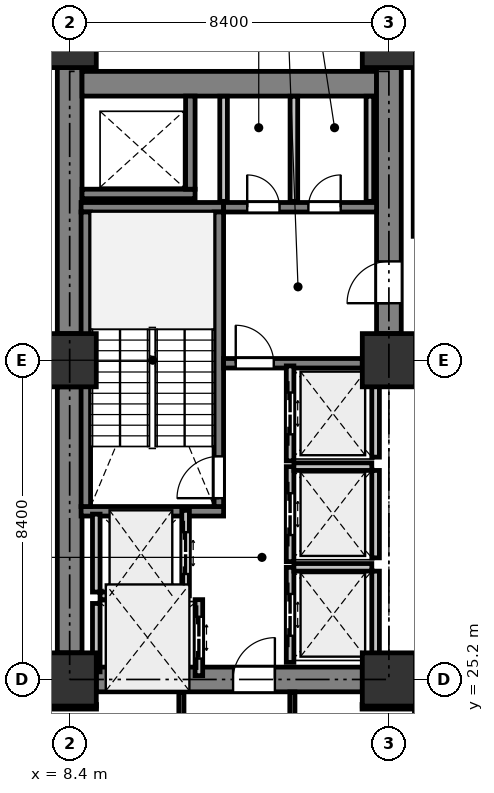
"""IFC4 building model, lengths in metres.
Left out: names, types, materials, properties, quantities, classifications, styles, units other than length and angle.
Written with IfcOpenShell. Run it as: python <this file> out.ifc"""

import sys

from ifc_helpers import new_model, si_unit, direction, frame, frame_2d, origin, origin_2d, place, context, subcontext, project, spatial, rectangle, extrude, element, fill, save


model = new_model("IFC4")
c1 = context("Model", 3, precision=1e-05, world=origin(), true_north=direction((0.0, 1.0)))
c2 = subcontext(c1, "Body", "Model", "MODEL_VIEW")
j1 = project(units=[si_unit("LENGTHUNIT", "METRE"), si_unit("PLANEANGLEUNIT", "RADIAN")], contexts=[c1])
p1 = place(None, origin())
s1 = spatial("IfcSite", under=j1, at=p1, CompositionType="ELEMENT")
p2 = place(p1, origin())
s2 = spatial("IfcBuilding", under=s1, at=p2, CompositionType="ELEMENT")
p3 = place(p2, frame((0.0, 0.0, 37.4)))
s3 = spatial("IfcBuildingStorey", under=s2, at=p3, CompositionType="ELEMENT", Elevation=37.4)
for number, where, z_axis, x_axis in (
    (1, (8.4, 25.2, 0.0), (0.0, 0.0, 1.0), (1.0, 0.0, 0.0)),
    (2, (8.4, 33.6, 0.0), (0.0, 0.0, 1.0), (1.0, 0.0, 0.0)),
    (3, (8.4, 42.0, 0.0), (0.0, 0.0, 1.0), (1.0, 0.0, 0.0)),
    (4, (16.8, 25.2, 0.0), (0.0, 0.0, 1.0), (1.0, 0.0, 0.0)),
    (5, (16.8, 33.6, 0.0), (0.0, 0.0, 1.0), (1.0, 0.0, 0.0)),
    (6, (16.8, 42.0, 0.0), (0.0, 0.0, 1.0), (1.0, 0.0, 0.0)),
):
    element("IfcColumn", number, at=place(p3, frame(where, z_axis=z_axis, x_axis=x_axis)), inside=s3, PredefinedType="COLUMN", context=c2, shape_type="SweptSolid", body=[
        extrude(rectangle(XDim=1.4, YDim=1.4, at=origin_2d()), origin(), (0.0, 0.0, 1.0), 4.2),
    ])
for number, where, z_axis, x_axis in (
    (7, (8.4, 25.9, 0.0), (0.0, 0.0, 1.0), (0.0, 1.0, 0.0)),
    (8, (8.4, 34.3, 0.0), (0.0, 0.0, 1.0), (0.0, 1.0, 0.0)),
):
    element("IfcWall", number, at=place(p3, frame(where, z_axis=z_axis, x_axis=x_axis)), inside=s3, PredefinedType="SHEAR", context=c2, shape_type="SweptSolid", body=[
        extrude(rectangle(XDim=7.0, YDim=0.65, at=frame_2d((3.5, 0.0))), origin(), (0.0, 0.0, 1.0), 3.925),
    ])
p4 = place(p3, frame((8.725, 40.875, 0.0), z_axis=(0.0, 0.0, 1.0), x_axis=(1.0, 0.0, 0.0)))
e9 = element("IfcWall", 9, at=p4, inside=s3, PredefinedType="SHEAR", context=c2, shape_type="SweptSolid", body=[
    extrude(rectangle(XDim=7.75, YDim=0.65, at=frame_2d((3.875, 0.0))), origin(), (0.0, 0.0, 1.0), 3.925),
])
p5 = place(p3, frame((16.8, 34.3, 0.0), z_axis=(0.0, 0.0, 1.0), x_axis=(0.0, 1.0, 0.0)))
e10 = element("IfcWall", 10, at=p5, inside=s3, PredefinedType="SHEAR", context=c2, shape_type="SweptSolid", body=[
    extrude(rectangle(XDim=7.0, YDim=0.65, at=frame_2d((3.5, 0.0))), origin(), (0.0, 0.0, 1.0), 3.925),
])
p6 = place(p5, frame((0.8, 0.0, 0.0)))
e11 = element("IfcOpeningElement", 11, at=p6, cuts=e10, PredefinedType="OPENING", context=c2, shape_type="SweptSolid", body=[
    extrude(rectangle(XDim=1.1, YDim=2.15, at=frame_2d((0.55, 1.075))), frame((0.0, 0.335, 0.0), z_axis=(0.0, -1.0, 0.0), x_axis=(1.0, 0.0, 0.0)), (0.0, 0.0, 1.0), 0.67),
])
p7 = place(p3, frame((9.1, 25.2, 0.0), z_axis=(0.0, 0.0, 1.0), x_axis=(1.0, 0.0, 0.0)))
e12 = element("IfcWall", 12, at=p7, inside=s3, PredefinedType="SHEAR", context=c2, shape_type="SweptSolid", body=[
    extrude(rectangle(XDim=7.0, YDim=0.65, at=frame_2d((3.5, 0.0))), origin(), (0.0, 0.0, 1.0), 3.925),
])
p8 = place(p7, frame((3.6, 0.0, 0.0)))
e13 = element("IfcOpeningElement", 13, at=p8, cuts=e12, PredefinedType="OPENING", context=c2, shape_type="SweptSolid", body=[
    extrude(rectangle(XDim=1.1, YDim=2.15, at=frame_2d((0.55, 1.075))), frame((0.0, 0.335, 0.0), z_axis=(0.0, -1.0, 0.0), x_axis=(1.0, 0.0, 0.0)), (0.0, 0.0, 1.0), 0.67),
])
for number, where, z_axis, x_axis in (
    (14, (12.45, 29.625, 0.0), (0.0, 0.0, 1.0), (-1.0, 0.0, 0.0)),
    (15, (12.45, 37.625, 0.0), (0.0, 0.0, 1.0), (-1.0, 0.0, 0.0)),
):
    element("IfcWall", number, at=place(p3, frame(where, z_axis=z_axis, x_axis=x_axis)), inside=s3, PredefinedType="SHEAR", context=c2, shape_type="SweptSolid", body=[
        extrude(rectangle(XDim=3.75, YDim=0.25, at=frame_2d((1.875, 0.0))), origin(), (0.0, 0.0, 1.0), 3.925),
    ])
p9 = place(p3, frame((12.325, 29.75, 0.0), z_axis=(0.0, 0.0, 1.0), x_axis=(0.0, 1.0, 0.0)))
e16 = element("IfcWall", 16, at=p9, inside=s3, PredefinedType="SHEAR", context=c2, shape_type="SweptSolid", body=[
    extrude(rectangle(XDim=7.75, YDim=0.25, at=frame_2d((3.875, 0.0))), origin(), (0.0, 0.0, 1.0), 3.925),
])
p10 = place(p9, frame((0.22, 0.0, 0.0)))
e17 = element("IfcOpeningElement", 17, at=p10, cuts=e16, PredefinedType="OPENING", context=c2, shape_type="SweptSolid", body=[
    extrude(rectangle(XDim=1.1, YDim=2.15, at=frame_2d((0.55, 1.075))), frame((0.0, 0.135, 0.0), z_axis=(0.0, -1.0, 0.0), x_axis=(1.0, 0.0, 0.0)), (0.0, 0.0, 1.0), 0.27),
])
p11 = place(p3, frame((8.825, 29.75, 0.0), z_axis=(0.0, 0.0, 1.0), x_axis=(0.0, 1.0, 0.0)))
e18 = element("IfcWall", 18, at=p11, inside=s3, PredefinedType="SHEAR", context=c2, shape_type="SweptSolid", body=[
    extrude(rectangle(XDim=7.75, YDim=0.25, at=frame_2d((3.875, 0.0))), origin(), (0.0, 0.0, 1.0), 3.925),
])
p12 = place(p3, frame((8.725, 37.975, 0.0), z_axis=(0.0, 0.0, 1.0), x_axis=(1.0, 0.0, 0.0)))
e19 = element("IfcWall", 19, at=p12, inside=s3, PredefinedType="SHEAR", context=c2, shape_type="SweptSolid", body=[
    extrude(rectangle(XDim=2.975, YDim=0.25, at=frame_2d((1.487, 0.0))), origin(), (0.0, 0.0, 1.0), 3.925),
])
p13 = place(p3, frame((11.575, 38.1, 0.0), z_axis=(0.0, 0.0, 1.0), x_axis=(0.0, 1.0, 0.0)))
e20 = element("IfcWall", 20, at=p13, inside=s3, PredefinedType="SHEAR", context=c2, shape_type="SweptSolid", body=[
    extrude(rectangle(XDim=2.45, YDim=0.25, at=frame_2d((1.225, 0.0))), origin(), (0.0, 0.0, 1.0), 3.925),
])
p14 = place(p3, frame((12.45, 33.52, 0.0), z_axis=(0.0, 0.0, 1.0), x_axis=(1.0, 0.0, 0.0)))
e21 = element("IfcWall", 21, at=p14, inside=s3, PredefinedType="SHEAR", context=c2, shape_type="SweptSolid", body=[
    extrude(rectangle(XDim=3.65, YDim=0.25, at=frame_2d((1.825, 0.0))), origin(), (0.0, 0.0, 1.0), 3.925),
])
p15 = place(p14, frame((0.32, 0.0, 0.0)))
e22 = element("IfcOpeningElement", 22, at=p15, cuts=e21, PredefinedType="OPENING", context=c2, shape_type="SweptSolid", body=[
    extrude(rectangle(XDim=1.0, YDim=2.15, at=frame_2d((0.5, 1.075))), frame((0.0, 0.135, 0.0), z_axis=(0.0, -1.0, 0.0), x_axis=(1.0, 0.0, 0.0)), (0.0, 0.0, 1.0), 0.27),
])
p16 = place(p3, frame((12.45, 37.625, 0.0), z_axis=(0.0, 0.0, 1.0), x_axis=(1.0, 0.0, 0.0)))
e23 = element("IfcWall", 23, at=p16, inside=s3, PredefinedType="SHEAR", context=c2, shape_type="SweptSolid", body=[
    extrude(rectangle(XDim=4.025, YDim=0.25, at=frame_2d((2.013, 0.0))), origin(), (0.0, 0.0, 1.0), 3.925),
])
p17 = place(p16, frame((0.622, 0.0, 0.0)))
e24 = element("IfcOpeningElement", 24, at=p17, cuts=e23, PredefinedType="OPENING", context=c2, shape_type="SweptSolid", body=[
    extrude(rectangle(XDim=0.85, YDim=2.15, at=frame_2d((0.425, 1.075))), frame((0.0, 0.135, 0.0), z_axis=(0.0, -1.0, 0.0), x_axis=(1.0, 0.0, 0.0)), (0.0, 0.0, 1.0), 0.27),
])
p18 = place(p16, frame((2.231, 0.0, 0.0)))
e25 = element("IfcOpeningElement", 25, at=p18, cuts=e23, PredefinedType="OPENING", context=c2, shape_type="SweptSolid", body=[
    extrude(rectangle(XDim=0.85, YDim=2.15, at=frame_2d((0.425, 1.075))), frame((0.0, 0.135, 0.0), z_axis=(0.0, -1.0, 0.0), x_axis=(1.0, 0.0, 0.0)), (0.0, 0.0, 1.0), 0.27),
])
p19 = place(p3, frame((11.45, 27.4, 0.0), z_axis=(0.0, 0.0, 1.0), x_axis=(0.0, 1.0, 0.0)))
e26 = element("IfcWall", 26, at=p19, inside=s3, PredefinedType="PARTITIONING", context=c2, shape_type="SweptSolid", body=[
    extrude(rectangle(XDim=2.25, YDim=0.2, at=frame_2d((1.125, 0.0))), origin(), (0.0, 0.0, 1.0), 3.925),
])
p20 = place(p19, frame((0.575, 0.0, 0.0)))
e27 = element("IfcOpeningElement", 27, at=p20, cuts=e26, PredefinedType="OPENING", context=c2, shape_type="SweptSolid", body=[
    extrude(rectangle(XDim=1.1, YDim=2.2, at=frame_2d((0.55, 1.1))), frame((0.0, 0.11, 0.0), z_axis=(0.0, -1.0, 0.0), x_axis=(1.0, 0.0, 0.0)), (0.0, 0.0, 1.0), 0.22),
])
p21 = place(p3, frame((9.1, 27.5, 0.0), z_axis=(0.0, 0.0, 1.0), x_axis=(0.0, 1.0, 0.0)))
e28 = element("IfcWall", 28, at=p21, inside=s3, PredefinedType="PARTITIONING", context=c2, shape_type="SweptSolid", body=[
    extrude(rectangle(XDim=2.05, YDim=0.2, at=frame_2d((1.025, 0.0))), origin(), (0.0, 0.0, 1.0), 3.925),
])
p22 = place(p3, frame((9.2, 27.4, 0.0), z_axis=(0.0, 0.0, 1.0), x_axis=(1.0, 0.0, 0.0)))
e29 = element("IfcWall", 29, at=p22, inside=s3, PredefinedType="PARTITIONING", context=c2, shape_type="SweptSolid", body=[
    extrude(rectangle(XDim=2.15, YDim=0.2, at=frame_2d((1.075, 0.0))), origin(), (0.0, 0.0, 1.0), 3.925),
])
p23 = place(p3, frame((11.8, 25.3, 0.0), z_axis=(0.0, 0.0, 1.0), x_axis=(0.0, 1.0, 0.0)))
e30 = element("IfcWall", 30, at=p23, inside=s3, PredefinedType="PARTITIONING", context=c2, shape_type="SweptSolid", body=[
    extrude(rectangle(XDim=2.0, YDim=0.2, at=frame_2d((1.0, 0.0))), origin(), (0.0, 0.0, 1.0), 3.925),
])
p24 = place(p23, frame((0.45, 0.0, 0.0)))
e31 = element("IfcOpeningElement", 31, at=p24, cuts=e30, PredefinedType="OPENING", context=c2, shape_type="SweptSolid", body=[
    extrude(rectangle(XDim=1.1, YDim=2.2, at=frame_2d((0.55, 1.1))), frame((0.0, 0.11, 0.0), z_axis=(0.0, -1.0, 0.0), x_axis=(1.0, 0.0, 0.0)), (0.0, 0.0, 1.0), 0.22),
])
p25 = place(p3, frame((9.1, 25.4, 0.0), z_axis=(0.0, 0.0, 1.0), x_axis=(0.0, 1.0, 0.0)))
e32 = element("IfcWall", 32, at=p25, inside=s3, PredefinedType="PARTITIONING", context=c2, shape_type="SweptSolid", body=[
    extrude(rectangle(XDim=1.8, YDim=0.2, at=frame_2d((0.9, 0.0))), origin(), (0.0, 0.0, 1.0), 3.925),
])
p26 = place(p3, frame((14.2, 25.65, 0.0), z_axis=(0.0, 0.0, 1.0), x_axis=(0.0, 1.0, 0.0)))
e33 = element("IfcWall", 33, at=p26, inside=s3, PredefinedType="PARTITIONING", context=c2, shape_type="SweptSolid", body=[
    extrude(rectangle(XDim=2.5, YDim=0.2, at=frame_2d((1.25, 0.0))), origin(), (0.0, 0.0, 1.0), 3.925),
])
p27 = place(p26, frame((0.7, 0.0, 0.0)))
e34 = element("IfcOpeningElement", 34, at=p27, cuts=e33, PredefinedType="OPENING", context=c2, shape_type="SweptSolid", body=[
    extrude(rectangle(XDim=1.1, YDim=2.2, at=frame_2d((0.55, 1.1))), frame((0.0, 0.11, 0.0), z_axis=(0.0, -1.0, 0.0), x_axis=(1.0, 0.0, 0.0)), (0.0, 0.0, 1.0), 0.22),
])
p28 = place(p3, frame((16.45, 25.75, 0.0), z_axis=(0.0, 0.0, 1.0), x_axis=(0.0, 1.0, 0.0)))
e35 = element("IfcWall", 35, at=p28, inside=s3, PredefinedType="PARTITIONING", context=c2, shape_type="SweptSolid", body=[
    extrude(rectangle(XDim=2.3, YDim=0.2, at=frame_2d((1.15, 0.0))), origin(), (0.0, 0.0, 1.0), 3.925),
])
p29 = place(p3, frame((14.3, 28.15, 0.0), z_axis=(0.0, 0.0, 1.0), x_axis=(1.0, 0.0, 0.0)))
e36 = element("IfcWall", 36, at=p29, inside=s3, PredefinedType="PARTITIONING", context=c2, shape_type="SweptSolid", body=[
    extrude(rectangle(XDim=2.05, YDim=0.2, at=frame_2d((1.025, 0.0))), origin(), (0.0, 0.0, 1.0), 3.925),
])
p30 = place(p3, frame((14.2, 28.3, 0.0), z_axis=(0.0, 0.0, 1.0), x_axis=(0.0, 1.0, 0.0)))
e37 = element("IfcWall", 37, at=p30, inside=s3, PredefinedType="PARTITIONING", context=c2, shape_type="SweptSolid", body=[
    extrude(rectangle(XDim=2.5, YDim=0.2, at=frame_2d((1.25, 0.0))), origin(), (0.0, 0.0, 1.0), 3.925),
])
p31 = place(p30, frame((0.7, 0.0, 0.0)))
e38 = element("IfcOpeningElement", 38, at=p31, cuts=e37, PredefinedType="OPENING", context=c2, shape_type="SweptSolid", body=[
    extrude(rectangle(XDim=1.1, YDim=2.2, at=frame_2d((0.55, 1.1))), frame((0.0, 0.11, 0.0), z_axis=(0.0, -1.0, 0.0), x_axis=(1.0, 0.0, 0.0)), (0.0, 0.0, 1.0), 0.22),
])
p32 = place(p3, frame((16.45, 28.4, 0.0), z_axis=(0.0, 0.0, 1.0), x_axis=(0.0, 1.0, 0.0)))
e39 = element("IfcWall", 39, at=p32, inside=s3, PredefinedType="PARTITIONING", context=c2, shape_type="SweptSolid", body=[
    extrude(rectangle(XDim=2.3, YDim=0.2, at=frame_2d((1.15, 0.0))), origin(), (0.0, 0.0, 1.0), 3.925),
])
p33 = place(p3, frame((14.3, 30.8, 0.0), z_axis=(0.0, 0.0, 1.0), x_axis=(1.0, 0.0, 0.0)))
e40 = element("IfcWall", 40, at=p33, inside=s3, PredefinedType="PARTITIONING", context=c2, shape_type="SweptSolid", body=[
    extrude(rectangle(XDim=2.05, YDim=0.2, at=frame_2d((1.025, 0.0))), origin(), (0.0, 0.0, 1.0), 3.925),
])
p34 = place(p3, frame((14.2, 30.95, 0.0), z_axis=(0.0, 0.0, 1.0), x_axis=(0.0, 1.0, 0.0)))
e41 = element("IfcWall", 41, at=p34, inside=s3, PredefinedType="PARTITIONING", context=c2, shape_type="SweptSolid", body=[
    extrude(rectangle(XDim=2.5, YDim=0.2, at=frame_2d((1.25, 0.0))), origin(), (0.0, 0.0, 1.0), 3.925),
])
p35 = place(p34, frame((0.7, 0.0, 0.0)))
e42 = element("IfcOpeningElement", 42, at=p35, cuts=e41, PredefinedType="OPENING", context=c2, shape_type="SweptSolid", body=[
    extrude(rectangle(XDim=1.1, YDim=2.2, at=frame_2d((0.55, 1.1))), frame((0.0, 0.11, 0.0), z_axis=(0.0, -1.0, 0.0), x_axis=(1.0, 0.0, 0.0)), (0.0, 0.0, 1.0), 0.22),
])
p36 = place(p3, frame((16.45, 31.05, 0.0), z_axis=(0.0, 0.0, 1.0), x_axis=(0.0, 1.0, 0.0)))
e43 = element("IfcWall", 43, at=p36, inside=s3, PredefinedType="PARTITIONING", context=c2, shape_type="SweptSolid", body=[
    extrude(rectangle(XDim=2.3, YDim=0.2, at=frame_2d((1.15, 0.0))), origin(), (0.0, 0.0, 1.0), 3.925),
])
for number, where, z_axis, x_axis in (
    (44, (14.3, 37.78, 0.0), (0.0, 0.0, 1.0), (0.0, 1.0, 0.0)),
    (45, (12.45, 40.546, 0.0), (0.0, 0.0, 1.0), (0.0, -1.0, 0.0)),
    (46, (16.3, 37.78, 0.0), (0.0, 0.0, 1.0), (0.0, 1.0, 0.0)),
):
    element("IfcWall", number, at=place(p3, frame(where, z_axis=z_axis, x_axis=x_axis)), inside=s3, PredefinedType="PARTITIONING", context=c2, shape_type="SweptSolid", body=[
        extrude(rectangle(XDim=2.766, YDim=0.2, at=frame_2d((1.383, 0.0))), origin(), (0.0, 0.0, 1.0), 2.825),
    ])
p37 = place(p3, frame((14.26, 24.871, 0.0), z_axis=(0.0, 0.0, 1.0), x_axis=(0.0, -1.0, 0.0)))
e47 = element("IfcWall", 47, at=p37, inside=s3, PredefinedType="PARTITIONING", context=c2, shape_type="SweptSolid", body=[
    extrude(rectangle(XDim=4.911, YDim=0.135, at=frame_2d((2.456, 0.0))), origin(), (0.0, 0.0, 1.0), 3.925),
])
p38 = place(p3, frame((17.54, 20.031, 0.0), z_axis=(0.0, 0.0, 1.0), x_axis=(0.0, 1.0, 0.0)))
e48 = element("IfcWall", 48, at=p38, inside=s3, PredefinedType="PARTITIONING", context=c2, shape_type="SweptSolid", body=[
    extrude(rectangle(XDim=5.168, YDim=0.135, at=frame_2d((2.584, 0.0))), origin(), (0.0, 0.0, 1.0), 3.313),
])
p39 = place(p38, frame((2.109, 0.0, 0.0)))
e49 = element("IfcOpeningElement", 49, at=p39, cuts=e48, PredefinedType="OPENING", context=c2, shape_type="SweptSolid", body=[
    extrude(rectangle(XDim=0.95, YDim=2.15, at=frame_2d((0.475, 1.075))), frame((0.0, 0.077, 0.0), z_axis=(0.0, -1.0, 0.0), x_axis=(1.0, 0.0, 0.0)), (0.0, 0.0, 1.0), 0.155),
])
p40 = place(p3, frame((17.469, 24.48, 0.0), z_axis=(0.0, 0.0, 1.0), x_axis=(-0.99999993688, 0.000355302873, 0.0)))
e50 = element("IfcWall", 50, at=p40, inside=s3, PredefinedType="PARTITIONING", context=c2, shape_type="SweptSolid", body=[
    extrude(rectangle(XDim=1.374, YDim=0.12, at=frame_2d((0.687, 0.0))), origin(), (0.0, 0.0, 1.0), 3.323),
])
p41 = place(p3, frame((9.106, 24.481, 0.0), z_axis=(0.0, 0.0, 1.0), x_axis=(-0.999999758706, -0.000694685487, 0.0)))
e51 = element("IfcWall", 51, at=p41, inside=s3, PredefinedType="PARTITIONING", context=c2, shape_type="SweptSolid", body=[
    extrude(rectangle(XDim=1.406, YDim=0.12, at=frame_2d((0.703, 0.0))), origin(), (0.0, 0.0, 1.0), 3.323),
])
p42 = place(p3, frame((11.34, 20.039, 0.0), z_axis=(0.0, 0.0, 1.0), x_axis=(0.0, 1.0, 0.0)))
e52 = element("IfcWall", 52, at=p42, inside=s3, PredefinedType="PARTITIONING", context=c2, shape_type="SweptSolid", body=[
    extrude(rectangle(XDim=4.832, YDim=0.135, at=frame_2d((2.416, 0.0))), origin(), (0.0, 0.0, 1.0), 3.925),
])
p43 = place(p3, frame((17.54, 36.86, 0.0), z_axis=(0.0, 0.0, 1.0), x_axis=(0.0, 1.0, 0.0)))
e53 = element("IfcWall", 53, at=p43, inside=s3, PredefinedType="PARTITIONING", context=c2, shape_type="SweptSolid", body=[
    extrude(rectangle(XDim=6.14, YDim=0.2, at=frame_2d((3.07, 0.0))), origin(), (0.0, 0.0, 1.0), 3.313),
])
p44 = place(p6, origin())
e54 = element("IfcDoor", 54, at=p44, inside=s3, OperationType="SINGLE_SWING_LEFT", PredefinedType="DOOR", context=c2, shape_type="SweptSolid", body=[
    extrude(rectangle(XDim=1.1, YDim=2.15, at=frame_2d((0.55, 1.075))), frame((0.0, 0.025, 0.0), z_axis=(0.0, -1.0, 0.0), x_axis=(1.0, 0.0, 0.0)), (0.0, 0.0, 1.0), 0.05),
])
fill(e11, e54)
p45 = place(p8, origin())
e55 = element("IfcDoor", 55, at=p45, inside=s3, OperationType="SINGLE_SWING_RIGHT", PredefinedType="DOOR", context=c2, shape_type="SweptSolid", body=[
    extrude(rectangle(XDim=1.1, YDim=2.15, at=frame_2d((0.55, 1.075))), frame((0.0, 0.025, 0.0), z_axis=(0.0, -1.0, 0.0), x_axis=(1.0, 0.0, 0.0)), (0.0, 0.0, 1.0), 0.05),
])
fill(e13, e55)
p46 = place(p10, origin())
e56 = element("IfcDoor", 56, at=p46, inside=s3, OperationType="SINGLE_SWING_LEFT", PredefinedType="DOOR", context=c2, shape_type="SweptSolid", body=[
    extrude(rectangle(XDim=1.1, YDim=2.15, at=frame_2d((0.55, 1.075))), frame((0.0, 0.025, 0.0), z_axis=(0.0, -1.0, 0.0), x_axis=(1.0, 0.0, 0.0)), (0.0, 0.0, 1.0), 0.05),
])
fill(e17, e56)
p47 = place(p15, origin())
e57 = element("IfcDoor", 57, at=p47, inside=s3, OperationType="SINGLE_SWING_LEFT", PredefinedType="DOOR", context=c2, shape_type="SweptSolid", body=[
    extrude(rectangle(XDim=1.0, YDim=2.15, at=frame_2d((0.5, 1.075))), frame((0.0, 0.025, 0.0), z_axis=(0.0, -1.0, 0.0), x_axis=(1.0, 0.0, 0.0)), (0.0, 0.0, 1.0), 0.05),
])
fill(e22, e57)
p48 = place(p20, origin())
e58 = element("IfcDoor", 58, at=p48, inside=s3, OperationType="DOUBLE_DOOR_SLIDING", PredefinedType="DOOR", context=c2, shape_type="SweptSolid", body=[
    extrude(rectangle(XDim=1.1, YDim=2.2, at=frame_2d((0.55, 1.1))), frame((0.0, 0.025, 0.0), z_axis=(0.0, -1.0, 0.0), x_axis=(1.0, 0.0, 0.0)), (0.0, 0.0, 1.0), 0.05),
])
fill(e27, e58)
p49 = place(p24, origin())
e59 = element("IfcDoor", 59, at=p49, inside=s3, OperationType="DOUBLE_DOOR_SLIDING", PredefinedType="DOOR", context=c2, shape_type="SweptSolid", body=[
    extrude(rectangle(XDim=1.1, YDim=2.2, at=frame_2d((0.55, 1.1))), frame((0.0, 0.025, 0.0), z_axis=(0.0, -1.0, 0.0), x_axis=(1.0, 0.0, 0.0)), (0.0, 0.0, 1.0), 0.05),
])
fill(e31, e59)
p50 = place(p27, origin())
e60 = element("IfcDoor", 60, at=p50, inside=s3, OperationType="DOUBLE_DOOR_SLIDING", PredefinedType="DOOR", context=c2, shape_type="SweptSolid", body=[
    extrude(rectangle(XDim=1.1, YDim=2.2, at=frame_2d((0.55, 1.1))), frame((0.0, 0.025, 0.0), z_axis=(0.0, -1.0, 0.0), x_axis=(1.0, 0.0, 0.0)), (0.0, 0.0, 1.0), 0.05),
])
fill(e34, e60)
p51 = place(p31, origin())
e61 = element("IfcDoor", 61, at=p51, inside=s3, OperationType="DOUBLE_DOOR_SLIDING", PredefinedType="DOOR", context=c2, shape_type="SweptSolid", body=[
    extrude(rectangle(XDim=1.1, YDim=2.2, at=frame_2d((0.55, 1.1))), frame((0.0, 0.025, 0.0), z_axis=(0.0, -1.0, 0.0), x_axis=(1.0, 0.0, 0.0)), (0.0, 0.0, 1.0), 0.05),
])
fill(e38, e61)
p52 = place(p35, origin())
e62 = element("IfcDoor", 62, at=p52, inside=s3, OperationType="DOUBLE_DOOR_SLIDING", PredefinedType="DOOR", context=c2, shape_type="SweptSolid", body=[
    extrude(rectangle(XDim=1.1, YDim=2.2, at=frame_2d((0.55, 1.1))), frame((0.0, 0.025, 0.0), z_axis=(0.0, -1.0, 0.0), x_axis=(1.0, 0.0, 0.0)), (0.0, 0.0, 1.0), 0.05),
])
fill(e42, e62)
p53 = place(p17, origin())
e63 = element("IfcDoor", 63, at=p53, inside=s3, OperationType="SINGLE_SWING_LEFT", PredefinedType="DOOR", context=c2, shape_type="SweptSolid", body=[
    extrude(rectangle(XDim=0.85, YDim=2.15, at=frame_2d((0.425, 1.075))), frame((0.0, 0.025, 0.0), z_axis=(0.0, -1.0, 0.0), x_axis=(1.0, 0.0, 0.0)), (0.0, 0.0, 1.0), 0.05),
])
fill(e24, e63)
p54 = place(p18, origin())
e64 = element("IfcDoor", 64, at=p54, inside=s3, OperationType="SINGLE_SWING_RIGHT", PredefinedType="DOOR", context=c2, shape_type="SweptSolid", body=[
    extrude(rectangle(XDim=0.85, YDim=2.15, at=frame_2d((0.425, 1.075))), frame((0.0, 0.025, 0.0), z_axis=(0.0, -1.0, 0.0), x_axis=(1.0, 0.0, 0.0)), (0.0, 0.0, 1.0), 0.05),
])
fill(e25, e64)
save(model, sys.argv[1])
